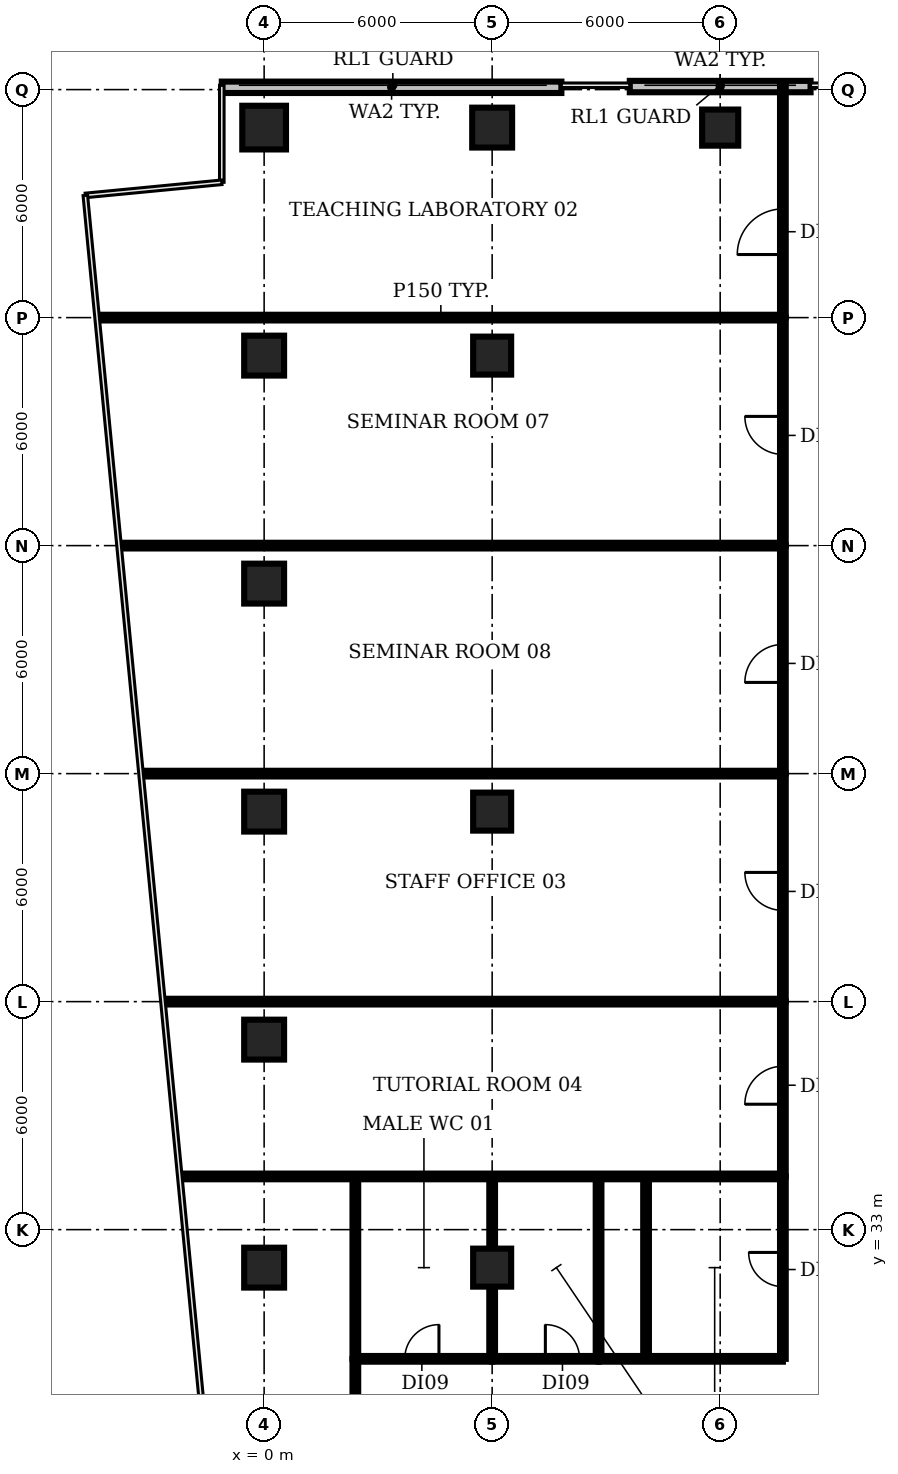
"""IFC4 building model, lengths in metres.
Left out: names, types, materials, properties, quantities, classifications, styles, units other than length and angle.
Written with IfcOpenShell. Run it as: python <this file> out.ifc"""

import sys

from ifc_helpers import new_model, si_unit, direction, frame, frame_2d, origin, origin_2d, place, context, subcontext, project, spatial, rectangle, circle, extrude, element, fill, save


model = new_model("IFC4")
c1 = context("Model", 3, precision=1e-05, world=origin(), true_north=direction((0.0, 1.0)))
c2 = subcontext(c1, "Body", "Model", "MODEL_VIEW")
j1 = project(units=[si_unit("LENGTHUNIT", "METRE"), si_unit("PLANEANGLEUNIT", "RADIAN")], contexts=[c1])
p1 = place(None, origin())
s1 = spatial("IfcSite", under=j1, at=p1, CompositionType="ELEMENT")
p2 = place(p1, origin())
s2 = spatial("IfcBuilding", under=s1, at=p2, CompositionType="ELEMENT")
p3 = place(p2, frame((0.0, 0.0, 75.2)))
s3 = spatial("IfcBuildingStorey", under=s2, at=p3, CompositionType="ELEMENT", Elevation=75.2)
for number, where, z_axis, x_axis in (
    (1, (0.0, 32.0, 0.0), (0.0, 0.0, 1.0), (1.0, 0.0, 0.0)),
    (2, (0.0, 38.0, 0.0), (0.0, 0.0, 1.0), (1.0, 0.0, 0.0)),
    (3, (0.0, 44.0, 0.0), (0.0, 0.0, 1.0), (1.0, 0.0, 0.0)),
    (4, (0.0, 50.0, 0.0), (0.0, 0.0, 1.0), (1.0, 0.0, 0.0)),
    (5, (0.0, 56.0, 0.0), (0.0, 0.0, 1.0), (1.0, 0.0, 0.0)),
):
    element("IfcColumn", number, at=place(p3, frame(where, z_axis=z_axis, x_axis=x_axis)), inside=s3, PredefinedType="COLUMN", context=c2, shape_type="SweptSolid", body=[
        extrude(rectangle(XDim=1.05, YDim=1.05, at=origin_2d()), origin(), (0.0, 0.0, 1.0), 3.2),
    ])
p4 = place(p3, frame((0.0, 62.0, 0.0), z_axis=(0.0, 0.0, 1.0), x_axis=(1.0, 0.0, 0.0)))
e6 = element("IfcColumn", 6, at=p4, inside=s3, PredefinedType="COLUMN", context=c2, shape_type="SweptSolid", body=[
    extrude(circle(Radius=0.575, at=origin_2d()), origin(), (0.0, 0.0, 1.0), 3.2),
])
for number, where, z_axis, x_axis in (
    (7, (6.0, 32.0, 0.0), (0.0, 0.0, 1.0), (1.0, 0.0, 0.0)),
    (8, (6.0, 44.0, 0.0), (0.0, 0.0, 1.0), (1.0, 0.0, 0.0)),
    (9, (6.0, 56.0, 0.0), (0.0, 0.0, 1.0), (1.0, 0.0, 0.0)),
):
    element("IfcColumn", number, at=place(p3, frame(where, z_axis=z_axis, x_axis=x_axis)), inside=s3, PredefinedType="COLUMN", context=c2, shape_type="SweptSolid", body=[
        extrude(rectangle(XDim=1.0, YDim=1.0, at=origin_2d()), origin(), (0.0, 0.0, 1.0), 3.2),
    ])
p5 = place(p3, frame((6.0, 62.0, 0.0), z_axis=(0.0, 0.0, 1.0), x_axis=(1.0, 0.0, 0.0)))
e10 = element("IfcColumn", 10, at=p5, inside=s3, PredefinedType="COLUMN", context=c2, shape_type="SweptSolid", body=[
    extrude(rectangle(XDim=1.05, YDim=1.05, at=origin_2d()), origin(), (0.0, 0.0, 1.0), 3.2),
])
p6 = place(p3, frame((12.0, 62.0, 0.0), z_axis=(0.0, 0.0, 1.0), x_axis=(1.0, 0.0, 0.0)))
e11 = element("IfcColumn", 11, at=p6, inside=s3, PredefinedType="COLUMN", context=c2, shape_type="SweptSolid", body=[
    extrude(rectangle(XDim=0.95, YDim=0.95, at=origin_2d()), origin(), (0.0, 0.0, 1.0), 3.8),
])
p7 = place(p3, frame((14.378, 63.08, 0.0), z_axis=(0.0, 0.0, 1.0), x_axis=(-1.0, 0.0, 0.0)))
e12 = element("IfcWall", 12, at=p7, inside=s3, PredefinedType="SOLIDWALL", context=c2, shape_type="SweptSolid", body=[
    extrude(rectangle(XDim=4.757, YDim=0.3, at=frame_2d((2.378, 0.0))), origin(), (0.0, 0.0, 1.0), 3.8),
])
p8 = place(p3, frame((7.822, 63.061, 0.0), z_axis=(0.0, 0.0, 1.0), x_axis=(-1.0, 0.0, 0.0)))
e13 = element("IfcWall", 13, at=p8, inside=s3, PredefinedType="SOLIDWALL", context=c2, shape_type="SweptSolid", body=[
    extrude(rectangle(XDim=8.936, YDim=0.3, at=frame_2d((4.468, 0.0))), origin(), (0.0, 0.0, 1.0), 3.8),
])
p9 = place(p3, frame((-4.35, 57.0, 0.0), z_axis=(0.0, 0.0, 1.0), x_axis=(1.0, 0.0, 0.0)))
e14 = element("IfcWall", 14, at=p9, inside=s3, PredefinedType="PARTITIONING", context=c2, shape_type="SweptSolid", body=[
    extrude(rectangle(XDim=18.0, YDim=0.15, at=frame_2d((9.0, 0.0))), origin(), (0.0, 0.0, 1.0), 2.78),
])
p10 = place(p3, frame((-3.77, 51.0, 0.0), z_axis=(0.0, 0.0, 1.0), x_axis=(1.0, 0.0, 0.0)))
e15 = element("IfcWall", 15, at=p10, inside=s3, PredefinedType="PARTITIONING", context=c2, shape_type="SweptSolid", body=[
    extrude(rectangle(XDim=17.42, YDim=0.15, at=frame_2d((8.71, 0.0))), origin(), (0.0, 0.0, 1.0), 2.78),
])
p11 = place(p3, frame((-3.19, 45.0, 0.0), z_axis=(0.0, 0.0, 1.0), x_axis=(1.0, 0.0, 0.0)))
e16 = element("IfcWall", 16, at=p11, inside=s3, PredefinedType="PARTITIONING", context=c2, shape_type="SweptSolid", body=[
    extrude(rectangle(XDim=16.84, YDim=0.15, at=frame_2d((8.42, 0.0))), origin(), (0.0, 0.0, 1.0), 2.78),
])
p12 = place(p3, frame((-2.61, 39.0, 0.0), z_axis=(0.0, 0.0, 1.0), x_axis=(1.0, 0.0, 0.0)))
e17 = element("IfcWall", 17, at=p12, inside=s3, PredefinedType="PARTITIONING", context=c2, shape_type="SweptSolid", body=[
    extrude(rectangle(XDim=16.26, YDim=0.15, at=frame_2d((8.13, 0.0))), origin(), (0.0, 0.0, 1.0), 2.78),
])
p13 = place(p3, frame((-2.17, 34.4, 0.0), z_axis=(0.0, 0.0, 1.0), x_axis=(1.0, 0.0, 0.0)))
e18 = element("IfcWall", 18, at=p13, inside=s3, PredefinedType="PARTITIONING", context=c2, shape_type="SweptSolid", body=[
    extrude(rectangle(XDim=15.82, YDim=0.15, at=frame_2d((7.91, 0.0))), origin(), (0.0, 0.0, 1.0), 2.78),
])
p14 = place(p3, frame((2.4, 25.7, 0.0), z_axis=(0.0, 0.0, 1.0), x_axis=(0.0, 1.0, 0.0)))
e19 = element("IfcWall", 19, at=p14, inside=s3, PredefinedType="PARTITIONING", context=c2, shape_type="SweptSolid", body=[
    extrude(rectangle(XDim=3.9, YDim=0.15, at=frame_2d((1.95, 0.0))), origin(), (0.0, 0.0, 1.0), 2.78),
])
p15 = place(p3, frame((2.4, 29.6, 0.0), z_axis=(0.0, 0.0, 1.0), x_axis=(0.0, 1.0, 0.0)))
e20 = element("IfcWall", 20, at=p15, inside=s3, PredefinedType="PARTITIONING", context=c2, shape_type="SweptSolid", body=[
    extrude(rectangle(XDim=4.8, YDim=0.15, at=frame_2d((2.4, 0.0))), origin(), (0.0, 0.0, 1.0), 2.78),
])
p16 = place(p3, frame((2.4, 29.6, 0.0), z_axis=(0.0, 0.0, 1.0), x_axis=(1.0, 0.0, 0.0)))
e21 = element("IfcWall", 21, at=p16, inside=s3, PredefinedType="PARTITIONING", context=c2, shape_type="SweptSolid", body=[
    extrude(rectangle(XDim=3.6, YDim=0.15, at=frame_2d((1.8, 0.0))), origin(), (0.0, 0.0, 1.0), 2.78),
])
p17 = place(p16, frame((1.3, 0.0, 0.0)))
e22 = element("IfcOpeningElement", 22, at=p17, cuts=e21, PredefinedType="OPENING", context=c2, shape_type="SweptSolid", body=[
    extrude(rectangle(XDim=0.9, YDim=2.1, at=frame_2d((0.45, 1.05))), frame((0.0, 0.085, 0.0), z_axis=(0.0, -1.0, 0.0), x_axis=(1.0, 0.0, 0.0)), (0.0, 0.0, 1.0), 0.17),
])
p18 = place(p3, frame((6.0, 29.6, 0.0), z_axis=(0.0, 0.0, 1.0), x_axis=(0.0, 1.0, 0.0)))
e23 = element("IfcWall", 23, at=p18, inside=s3, PredefinedType="PARTITIONING", context=c2, shape_type="SweptSolid", body=[
    extrude(rectangle(XDim=4.8, YDim=0.15, at=frame_2d((2.4, 0.0))), origin(), (0.0, 0.0, 1.0), 2.78),
])
p19 = place(p3, frame((6.0, 29.6, 0.0), z_axis=(0.0, 0.0, 1.0), x_axis=(1.0, 0.0, 0.0)))
e24 = element("IfcWall", 24, at=p19, inside=s3, PredefinedType="PARTITIONING", context=c2, shape_type="SweptSolid", body=[
    extrude(rectangle(XDim=2.8, YDim=0.15, at=frame_2d((1.4, 0.0))), origin(), (0.0, 0.0, 1.0), 2.78),
])
p20 = place(p19, frame((1.4, 0.0, 0.0)))
e25 = element("IfcOpeningElement", 25, at=p20, cuts=e24, PredefinedType="OPENING", context=c2, shape_type="SweptSolid", body=[
    extrude(rectangle(XDim=0.9, YDim=2.1, at=frame_2d((0.45, 1.05))), frame((0.0, 0.085, 0.0), z_axis=(0.0, -1.0, 0.0), x_axis=(1.0, 0.0, 0.0)), (0.0, 0.0, 1.0), 0.17),
])
p21 = place(p3, frame((8.8, 29.6, 0.0), z_axis=(0.0, 0.0, 1.0), x_axis=(0.0, 1.0, 0.0)))
e26 = element("IfcWall", 26, at=p21, inside=s3, PredefinedType="PARTITIONING", context=c2, shape_type="SweptSolid", body=[
    extrude(rectangle(XDim=4.8, YDim=0.15, at=frame_2d((2.4, 0.0))), origin(), (0.0, 0.0, 1.0), 2.78),
])
p22 = place(p3, frame((8.8, 29.6, 0.0), z_axis=(0.0, 0.0, 1.0), x_axis=(1.0, 0.0, 0.0)))
e27 = element("IfcWall", 27, at=p22, inside=s3, PredefinedType="PARTITIONING", context=c2, shape_type="SweptSolid", body=[
    extrude(rectangle(XDim=4.85, YDim=0.15, at=frame_2d((2.425, 0.0))), origin(), (0.0, 0.0, 1.0), 2.78),
])
p23 = place(p3, frame((10.05, 29.6, 0.0), z_axis=(0.0, 0.0, 1.0), x_axis=(0.0, 1.0, 0.0)))
e28 = element("IfcWall", 28, at=p23, inside=s3, PredefinedType="PARTITIONING", context=c2, shape_type="SweptSolid", body=[
    extrude(rectangle(XDim=4.8, YDim=0.15, at=frame_2d((2.4, 0.0))), origin(), (0.0, 0.0, 1.0), 2.78),
])
p24 = place(p3, frame((13.65, 29.6, 0.0), z_axis=(0.0, 0.0, 1.0), x_axis=(0.0, 1.0, 0.0)))
e29 = element("IfcWall", 29, at=p24, inside=s3, PredefinedType="PARTITIONING", context=c2, shape_type="SweptSolid", body=[
    extrude(rectangle(XDim=4.8, YDim=0.15, at=frame_2d((2.4, 0.0))), origin(), (0.0, 0.0, 1.0), 2.78),
])
p25 = place(p24, frame((1.9, 0.0, 0.0)))
e30 = element("IfcOpeningElement", 30, at=p25, cuts=e29, PredefinedType="OPENING", context=c2, shape_type="SweptSolid", body=[
    extrude(rectangle(XDim=0.9, YDim=2.1, at=frame_2d((0.45, 1.05))), frame((0.0, 0.085, 0.0), z_axis=(0.0, -1.0, 0.0), x_axis=(1.0, 0.0, 0.0)), (0.0, 0.0, 1.0), 0.17),
])
p26 = place(p3, frame((13.65, 34.4, 0.0), z_axis=(0.0, 0.0, 1.0), x_axis=(0.0, 1.0, 0.0)))
e31 = element("IfcWall", 31, at=p26, inside=s3, PredefinedType="PARTITIONING", context=c2, shape_type="SweptSolid", body=[
    extrude(rectangle(XDim=4.6, YDim=0.15, at=frame_2d((2.3, 0.0))), origin(), (0.0, 0.0, 1.0), 2.78),
])
p27 = place(p26, frame((1.9, 0.0, 0.0)))
e32 = element("IfcOpeningElement", 32, at=p27, cuts=e31, PredefinedType="OPENING", context=c2, shape_type="SweptSolid", body=[
    extrude(rectangle(XDim=1.0, YDim=2.1, at=frame_2d((0.5, 1.05))), frame((0.0, 0.085, 0.0), z_axis=(0.0, -1.0, 0.0), x_axis=(1.0, 0.0, 0.0)), (0.0, 0.0, 1.0), 0.17),
])
p28 = place(p3, frame((13.65, 39.0, 0.0), z_axis=(0.0, 0.0, 1.0), x_axis=(0.0, 1.0, 0.0)))
e33 = element("IfcWall", 33, at=p28, inside=s3, PredefinedType="PARTITIONING", context=c2, shape_type="SweptSolid", body=[
    extrude(rectangle(XDim=6.0, YDim=0.15, at=frame_2d((3.0, 0.0))), origin(), (0.0, 0.0, 1.0), 2.78),
])
p29 = place(p28, frame((2.4, 0.0, 0.0)))
e34 = element("IfcOpeningElement", 34, at=p29, cuts=e33, PredefinedType="OPENING", context=c2, shape_type="SweptSolid", body=[
    extrude(rectangle(XDim=1.0, YDim=2.1, at=frame_2d((0.5, 1.05))), frame((0.0, 0.085, 0.0), z_axis=(0.0, -1.0, 0.0), x_axis=(1.0, 0.0, 0.0)), (0.0, 0.0, 1.0), 0.17),
])
p30 = place(p3, frame((13.65, 45.0, 0.0), z_axis=(0.0, 0.0, 1.0), x_axis=(0.0, 1.0, 0.0)))
e35 = element("IfcWall", 35, at=p30, inside=s3, PredefinedType="PARTITIONING", context=c2, shape_type="SweptSolid", body=[
    extrude(rectangle(XDim=6.0, YDim=0.15, at=frame_2d((3.0, 0.0))), origin(), (0.0, 0.0, 1.0), 2.78),
])
p31 = place(p30, frame((2.4, 0.0, 0.0)))
e36 = element("IfcOpeningElement", 36, at=p31, cuts=e35, PredefinedType="OPENING", context=c2, shape_type="SweptSolid", body=[
    extrude(rectangle(XDim=1.0, YDim=2.1, at=frame_2d((0.5, 1.05))), frame((0.0, 0.085, 0.0), z_axis=(0.0, -1.0, 0.0), x_axis=(1.0, 0.0, 0.0)), (0.0, 0.0, 1.0), 0.17),
])
p32 = place(p3, frame((13.65, 51.0, 0.0), z_axis=(0.0, 0.0, 1.0), x_axis=(0.0, 1.0, 0.0)))
e37 = element("IfcWall", 37, at=p32, inside=s3, PredefinedType="PARTITIONING", context=c2, shape_type="SweptSolid", body=[
    extrude(rectangle(XDim=6.0, YDim=0.15, at=frame_2d((3.0, 0.0))), origin(), (0.0, 0.0, 1.0), 2.78),
])
p33 = place(p32, frame((2.4, 0.0, 0.0)))
e38 = element("IfcOpeningElement", 38, at=p33, cuts=e37, PredefinedType="OPENING", context=c2, shape_type="SweptSolid", body=[
    extrude(rectangle(XDim=1.0, YDim=2.1, at=frame_2d((0.5, 1.05))), frame((0.0, 0.085, 0.0), z_axis=(0.0, -1.0, 0.0), x_axis=(1.0, 0.0, 0.0)), (0.0, 0.0, 1.0), 0.17),
])
p34 = place(p3, frame((13.65, 57.0, 0.0), z_axis=(0.0, 0.0, 1.0), x_axis=(0.0, 1.0, 0.0)))
e39 = element("IfcWall", 39, at=p34, inside=s3, PredefinedType="PARTITIONING", context=c2, shape_type="SweptSolid", body=[
    extrude(rectangle(XDim=6.174, YDim=0.15, at=frame_2d((3.087, 0.0))), origin(), (0.0, 0.0, 1.0), 2.78),
])
p35 = place(p34, frame((1.66, 0.0, 0.0)))
e40 = element("IfcOpeningElement", 40, at=p35, cuts=e39, PredefinedType="OPENING", context=c2, shape_type="SweptSolid", body=[
    extrude(rectangle(XDim=1.2, YDim=2.1, at=frame_2d((0.6, 1.05))), frame((0.0, 0.085, 0.0), z_axis=(0.0, -1.0, 0.0), x_axis=(1.0, 0.0, 0.0)), (0.0, 0.0, 1.0), 0.17),
])
p36 = place(p17, origin())
e41 = element("IfcDoor", 41, at=p36, inside=s3, OperationType="SINGLE_SWING_RIGHT", PredefinedType="DOOR", context=c2, shape_type="SweptSolid", body=[
    extrude(rectangle(XDim=0.9, YDim=2.1, at=frame_2d((0.45, 1.05))), frame((0.0, 0.025, 0.0), z_axis=(0.0, -1.0, 0.0), x_axis=(1.0, 0.0, 0.0)), (0.0, 0.0, 1.0), 0.05),
])
fill(e22, e41)
p37 = place(p20, origin())
e42 = element("IfcDoor", 42, at=p37, inside=s3, OperationType="SINGLE_SWING_LEFT", PredefinedType="DOOR", context=c2, shape_type="SweptSolid", body=[
    extrude(rectangle(XDim=0.9, YDim=2.1, at=frame_2d((0.45, 1.05))), frame((0.0, 0.025, 0.0), z_axis=(0.0, -1.0, 0.0), x_axis=(1.0, 0.0, 0.0)), (0.0, 0.0, 1.0), 0.05),
])
fill(e25, e42)
p38 = place(p25, origin())
e43 = element("IfcDoor", 43, at=p38, inside=s3, OperationType="SINGLE_SWING_RIGHT", PredefinedType="DOOR", context=c2, shape_type="SweptSolid", body=[
    extrude(rectangle(XDim=0.9, YDim=2.1, at=frame_2d((0.45, 1.05))), frame((0.0, 0.025, 0.0), z_axis=(0.0, -1.0, 0.0), x_axis=(1.0, 0.0, 0.0)), (0.0, 0.0, 1.0), 0.05),
])
fill(e30, e43)
p39 = place(p27, origin())
e44 = element("IfcDoor", 44, at=p39, inside=s3, OperationType="SINGLE_SWING_LEFT", PredefinedType="DOOR", context=c2, shape_type="SweptSolid", body=[
    extrude(rectangle(XDim=1.0, YDim=2.1, at=frame_2d((0.5, 1.05))), frame((0.0, 0.025, 0.0), z_axis=(0.0, -1.0, 0.0), x_axis=(1.0, 0.0, 0.0)), (0.0, 0.0, 1.0), 0.05),
])
fill(e32, e44)
p40 = place(p29, origin())
e45 = element("IfcDoor", 45, at=p40, inside=s3, OperationType="SINGLE_SWING_RIGHT", PredefinedType="DOOR", context=c2, shape_type="SweptSolid", body=[
    extrude(rectangle(XDim=1.0, YDim=2.1, at=frame_2d((0.5, 1.05))), frame((0.0, 0.025, 0.0), z_axis=(0.0, -1.0, 0.0), x_axis=(1.0, 0.0, 0.0)), (0.0, 0.0, 1.0), 0.05),
])
fill(e34, e45)
p41 = place(p31, origin())
e46 = element("IfcDoor", 46, at=p41, inside=s3, OperationType="SINGLE_SWING_LEFT", PredefinedType="DOOR", context=c2, shape_type="SweptSolid", body=[
    extrude(rectangle(XDim=1.0, YDim=2.1, at=frame_2d((0.5, 1.05))), frame((0.0, 0.025, 0.0), z_axis=(0.0, -1.0, 0.0), x_axis=(1.0, 0.0, 0.0)), (0.0, 0.0, 1.0), 0.05),
])
fill(e36, e46)
p42 = place(p33, origin())
e47 = element("IfcDoor", 47, at=p42, inside=s3, OperationType="SINGLE_SWING_RIGHT", PredefinedType="DOOR", context=c2, shape_type="SweptSolid", body=[
    extrude(rectangle(XDim=1.0, YDim=2.1, at=frame_2d((0.5, 1.05))), frame((0.0, 0.025, 0.0), z_axis=(0.0, -1.0, 0.0), x_axis=(1.0, 0.0, 0.0)), (0.0, 0.0, 1.0), 0.05),
])
fill(e38, e47)
p43 = place(p35, origin())
e48 = element("IfcDoor", 48, at=p43, inside=s3, OperationType="SINGLE_SWING_LEFT", PredefinedType="DOOR", context=c2, shape_type="SweptSolid", body=[
    extrude(rectangle(XDim=1.2, YDim=2.1, at=frame_2d((0.6, 1.05))), frame((0.0, 0.025, 0.0), z_axis=(0.0, -1.0, 0.0), x_axis=(1.0, 0.0, 0.0)), (0.0, 0.0, 1.0), 0.05),
])
fill(e40, e48)
save(model, sys.argv[1])
